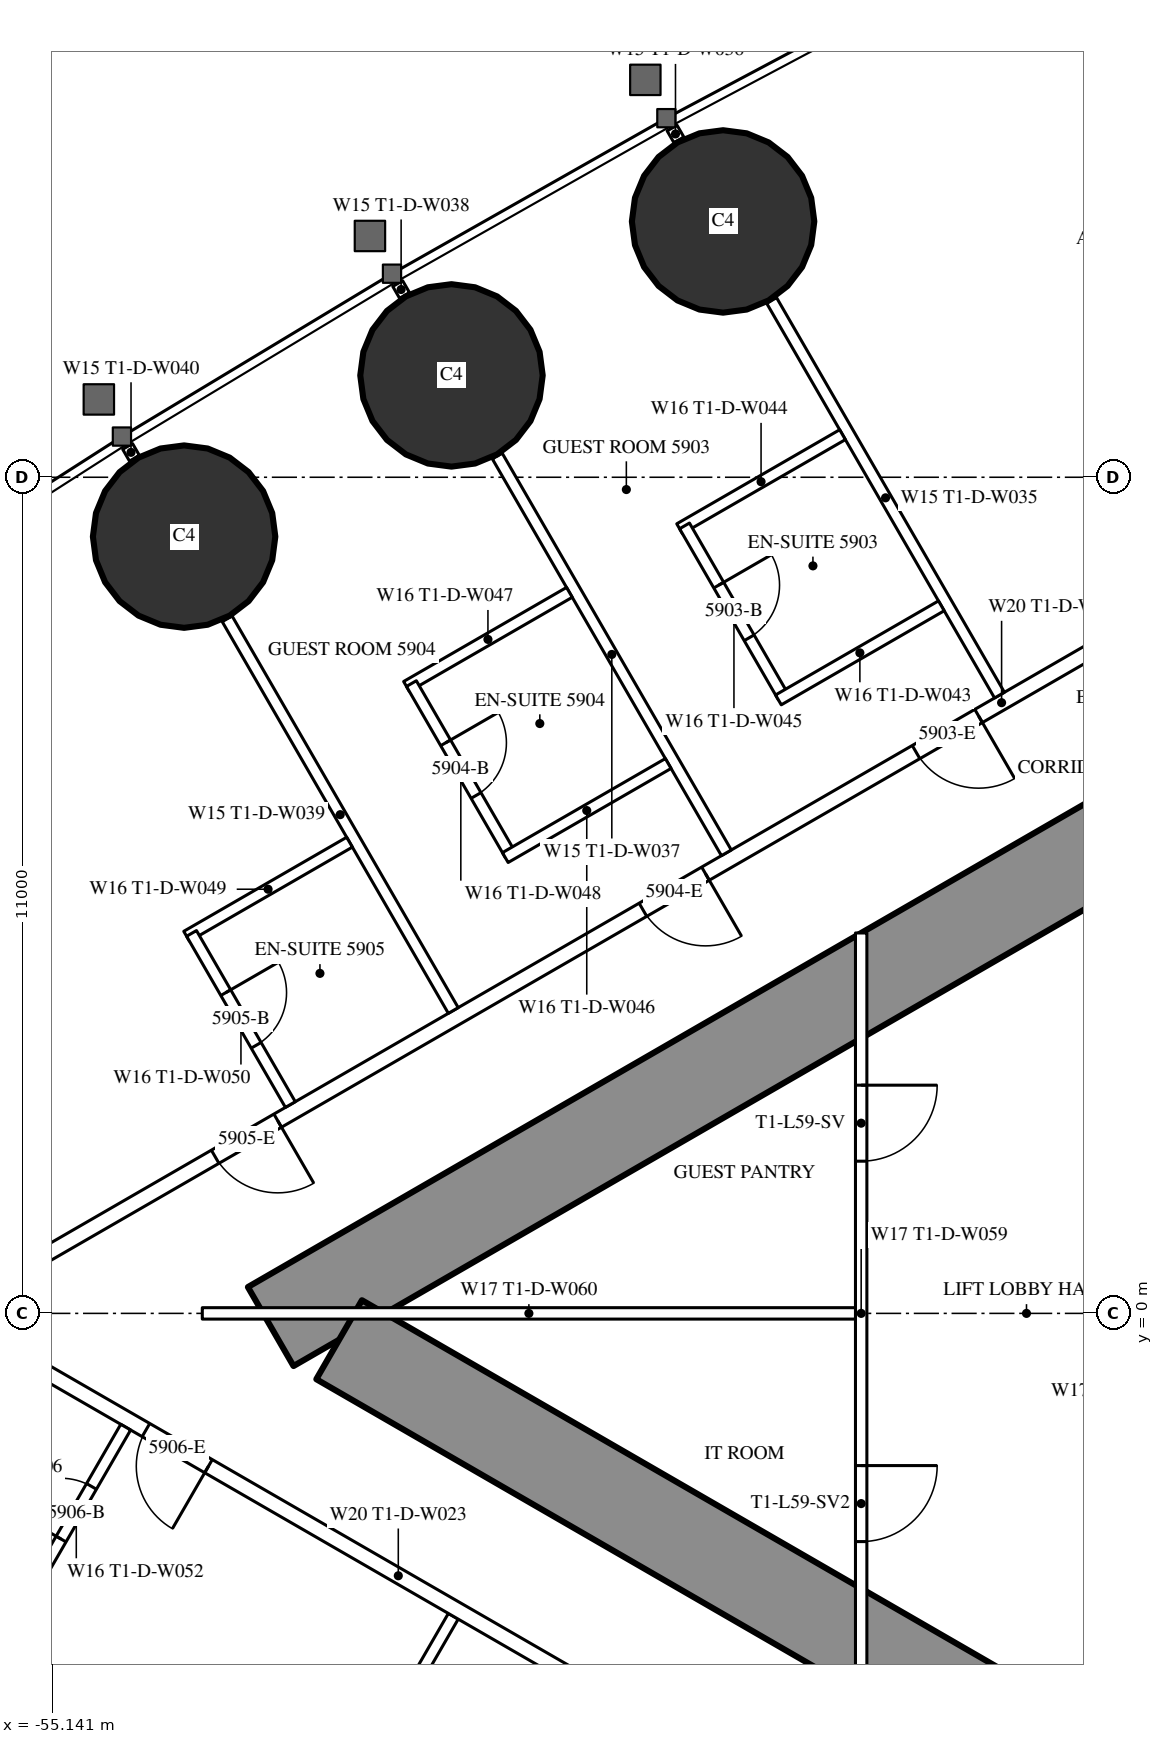
"""IFC4 building model, lengths in metres.
Left out: names, types, materials, properties, quantities, classifications, styles, units other than length and angle.
Written with IfcOpenShell. Run it as: python <this file> out.ifc"""

import sys

from ifc_helpers import new_model, si_unit, direction, frame, frame_2d, origin, origin_2d, place, context, subcontext, project, spatial, rectangle, circle, extrude, element, fill, save


model = new_model("IFC4")
c1 = context("Model", 3, precision=1e-05, world=origin(), true_north=direction((0.0, 1.0)))
c2 = subcontext(c1, "Body", "Model", "MODEL_VIEW")
j1 = project(units=[si_unit("LENGTHUNIT", "METRE"), si_unit("PLANEANGLEUNIT", "RADIAN")], contexts=[c1])
p1 = place(None, origin())
s1 = spatial("IfcSite", under=j1, at=p1, CompositionType="ELEMENT")
p2 = place(p1, origin())
s2 = spatial("IfcBuilding", under=s1, at=p2, CompositionType="ELEMENT")
p3 = place(p2, frame((0.0, 0.0, 222.5)))
s3 = spatial("IfcBuildingStorey", under=s2, at=p3, CompositionType="ELEMENT", Elevation=222.5)
for number, where, z_axis, x_axis in (
    (1, (-46.317, 14.365, 0.0), (0.0, 0.0, 1.0), (1.0, 0.0, 0.0)),
    (2, (-49.89, 12.34, 0.0), (0.0, 0.0, 1.0), (1.0, 0.0, 0.0)),
    (3, (-53.408, 10.219, 0.0), (0.0, 0.0, 1.0), (1.0, 0.0, 0.0)),
):
    element("IfcColumn", number, at=place(p3, frame(where, z_axis=z_axis, x_axis=x_axis)), inside=s3, PredefinedType="COLUMN", context=c2, shape_type="SweptSolid", body=[
        extrude(circle(Radius=1.2, at=origin_2d()), origin(), (0.0, 0.0, 1.0), 3.6),
    ])
p4 = place(p3, frame((-27.2, 14.3, 0.0), z_axis=(0.0, 0.0, 1.0), x_axis=(-0.866026593062, -0.499997940104, 0.0)))
e4 = element("IfcWall", 4, at=p4, inside=s3, PredefinedType="SHEAR", context=c2, shape_type="SweptSolid", body=[
    extrude(rectangle(XDim=28.946, YDim=1.2, at=frame_2d((14.473, 0.0))), origin(), (0.0, 0.0, 1.0), 3.6),
])
p5 = place(p4, frame((4.6, 0.0, 0.0)))
e5 = element("IfcOpeningElement", 5, at=p5, cuts=e4, PredefinedType="OPENING", context=c2, shape_type="SweptSolid", body=[
    extrude(rectangle(XDim=1.0, YDim=2.2, at=frame_2d((0.5, 1.1))), frame((0.0, 0.61, 0.0), z_axis=(0.0, -1.0, 0.0), x_axis=(1.0, 0.0, 0.0)), (0.0, 0.0, 1.0), 1.22),
])
p6 = place(p4, frame((13.395, 0.0, 0.0)))
e6 = element("IfcOpeningElement", 6, at=p6, cuts=e4, PredefinedType="OPENING", context=c2, shape_type="SweptSolid", body=[
    extrude(rectangle(XDim=1.8, YDim=2.2, at=frame_2d((0.9, 1.1))), frame((0.0, 0.61, 0.0), z_axis=(0.0, -1.0, 0.0), x_axis=(1.0, 0.0, 0.0)), (0.0, 0.0, 1.0), 1.22),
])
p7 = place(p3, frame((-27.2, -14.3, 0.0), z_axis=(0.0, 0.0, 1.0), x_axis=(-0.866024021859, 0.500002393557, 0.0)))
e7 = element("IfcWall", 7, at=p7, inside=s3, PredefinedType="SHEAR", context=c2, shape_type="SweptSolid", body=[
    extrude(rectangle(XDim=27.907, YDim=1.2, at=frame_2d((13.954, 0.0))), origin(), (0.0, 0.0, 1.0), 3.6),
])
p8 = place(p7, frame((4.6, 0.0, 0.0)))
e8 = element("IfcOpeningElement", 8, at=p8, cuts=e7, PredefinedType="OPENING", context=c2, shape_type="SweptSolid", body=[
    extrude(rectangle(XDim=1.0, YDim=2.2, at=frame_2d((0.5, 1.1))), frame((0.0, 0.61, 0.0), z_axis=(0.0, -1.0, 0.0), x_axis=(1.0, 0.0, 0.0)), (0.0, 0.0, 1.0), 1.22),
])
p9 = place(p7, frame((13.395, 0.0, 0.0)))
e9 = element("IfcOpeningElement", 9, at=p9, cuts=e7, PredefinedType="OPENING", context=c2, shape_type="SweptSolid", body=[
    extrude(rectangle(XDim=1.8, YDim=2.2, at=frame_2d((0.9, 1.1))), frame((0.0, 0.61, 0.0), z_axis=(0.0, -1.0, 0.0), x_axis=(1.0, 0.0, 0.0)), (0.0, 0.0, 1.0), 1.22),
])
p10 = place(p3, frame((-28.737, 16.068, 0.0), z_axis=(0.0, 0.0, 1.0), x_axis=(-0.866026057212, -0.499998868229, 0.0)))
e10 = element("IfcWall", 10, at=p10, inside=s3, PredefinedType="PARTITIONING", context=c2, shape_type="SweptSolid", body=[
    extrude(rectangle(XDim=32.137, YDim=0.2, at=frame_2d((16.068, 0.0))), origin(), (0.0, 0.0, 1.0), 3.35),
])
p11 = place(p10, frame((1.08, 0.0, 0.0)))
e11 = element("IfcOpeningElement", 11, at=p11, cuts=e10, PredefinedType="OPENING", context=c2, shape_type="SweptSolid", body=[
    extrude(rectangle(XDim=1.8, YDim=2.03, at=frame_2d((0.9, 1.015))), frame((0.0, 0.11, 0.0), z_axis=(0.0, -1.0, 0.0), x_axis=(1.0, 0.0, 0.0)), (0.0, 0.0, 1.0), 0.22),
])
p12 = place(p10, frame((6.86, 0.0, 0.0)))
e12 = element("IfcOpeningElement", 12, at=p12, cuts=e10, PredefinedType="OPENING", context=c2, shape_type="SweptSolid", body=[
    extrude(rectangle(XDim=1.0, YDim=2.2, at=frame_2d((0.5, 1.1))), frame((0.0, 0.11, 0.0), z_axis=(0.0, -1.0, 0.0), x_axis=(1.0, 0.0, 0.0)), (0.0, 0.0, 1.0), 0.22),
])
p13 = place(p10, frame((16.418, 0.0, 0.0)))
e13 = element("IfcOpeningElement", 13, at=p13, cuts=e10, PredefinedType="OPENING", context=c2, shape_type="SweptSolid", body=[
    extrude(rectangle(XDim=0.95, YDim=2.2, at=frame_2d((0.475, 1.1))), frame((0.0, 0.11, 0.0), z_axis=(0.0, -1.0, 0.0), x_axis=(1.0, 0.0, 0.0)), (0.0, 0.0, 1.0), 0.22),
])
p14 = place(p10, frame((20.567, 0.0, 0.0)))
e14 = element("IfcOpeningElement", 14, at=p14, cuts=e10, PredefinedType="OPENING", context=c2, shape_type="SweptSolid", body=[
    extrude(rectangle(XDim=0.95, YDim=2.2, at=frame_2d((0.475, 1.1))), frame((0.0, 0.11, 0.0), z_axis=(0.0, -1.0, 0.0), x_axis=(1.0, 0.0, 0.0)), (0.0, 0.0, 1.0), 0.22),
])
p15 = place(p10, frame((27.065, 0.0, 0.0)))
e15 = element("IfcOpeningElement", 15, at=p15, cuts=e10, PredefinedType="OPENING", context=c2, shape_type="SweptSolid", body=[
    extrude(rectangle(XDim=0.95, YDim=2.2, at=frame_2d((0.475, 1.1))), frame((0.0, 0.11, 0.0), z_axis=(0.0, -1.0, 0.0), x_axis=(1.0, 0.0, 0.0)), (0.0, 0.0, 1.0), 0.22),
])
p16 = place(p3, frame((-42.68, 8.134, 0.0), z_axis=(0.0, 0.0, 1.0), x_axis=(-0.499984479505, 0.866034364361, 0.0)))
e16 = element("IfcWall", 16, at=p16, inside=s3, PredefinedType="PARTITIONING", context=c2, shape_type="SweptSolid", body=[
    extrude(rectangle(XDim=5.995, YDim=0.15, at=frame_2d((2.998, 0.0))), origin(), (0.0, 0.0, 1.0), 2.45),
])
p17 = place(p3, frame((-46.898, 15.439, 0.0), z_axis=(0.0, 0.0, 1.0), x_axis=(-0.500232303069, 0.865891241997, 0.0)))
e17 = element("IfcWall", 17, at=p17, inside=s3, PredefinedType="PARTITIONING", context=c2, shape_type="SweptSolid", body=[
    extrude(rectangle(XDim=0.18, YDim=0.15, at=frame_2d((0.09, 0.0))), origin(), (0.0, 0.0, 1.0), 2.45),
])
p18 = place(p3, frame((-46.274, 6.059, 0.0), z_axis=(0.0, 0.0, 1.0), x_axis=(-0.500020471368, 0.866013584312, 0.0)))
e18 = element("IfcWall", 18, at=p18, inside=s3, PredefinedType="PARTITIONING", context=c2, shape_type="SweptSolid", body=[
    extrude(rectangle(XDim=6.028, YDim=0.15, at=frame_2d((3.014, 0.0))), origin(), (0.0, 0.0, 1.0), 2.45),
])
p19 = place(p3, frame((-50.508, 13.392, 0.0), z_axis=(0.0, 0.0, 1.0), x_axis=(-0.499644091975, 0.866230789891, 0.0)))
e19 = element("IfcWall", 19, at=p19, inside=s3, PredefinedType="PARTITIONING", context=c2, shape_type="SweptSolid", body=[
    extrude(rectangle(XDim=0.18, YDim=0.15, at=frame_2d((0.09, 0.0))), origin(), (0.0, 0.0, 1.0), 2.45),
])
p20 = place(p3, frame((-49.866, 3.985, 0.0), z_axis=(0.0, 0.0, 1.0), x_axis=(-0.500000694566, 0.866025002776, 0.0)))
e20 = element("IfcWall", 20, at=p20, inside=s3, PredefinedType="PARTITIONING", context=c2, shape_type="SweptSolid", body=[
    extrude(rectangle(XDim=5.95, YDim=0.15, at=frame_2d((2.975, 0.0))), origin(), (0.0, 0.0, 1.0), 2.45),
])
p21 = place(p3, frame((-54.061, 11.25, 0.0), z_axis=(0.0, 0.0, 1.0), x_axis=(-0.500391173478, 0.865799441849, 0.0)))
e21 = element("IfcWall", 21, at=p21, inside=s3, PredefinedType="PARTITIONING", context=c2, shape_type="SweptSolid", body=[
    extrude(rectangle(XDim=0.179, YDim=0.15, at=frame_2d((0.089, 0.0))), origin(), (0.0, 0.0, 1.0), 2.45),
])
p22 = place(p3, frame((-49.866, -3.985, 0.0), z_axis=(0.0, 0.0, 1.0), x_axis=(-0.500000694566, -0.866025002776, 0.0)))
e22 = element("IfcWall", 22, at=p22, inside=s3, PredefinedType="PARTITIONING", context=c2, shape_type="SweptSolid", body=[
    extrude(rectangle(XDim=5.95, YDim=0.15, at=frame_2d((2.975, 0.0))), origin(), (0.0, 0.0, 1.0), 2.45),
])
p23 = place(p22, frame((3.5, 0.0, 0.0)))
e23 = element("IfcOpeningElement", 23, at=p23, cuts=e22, PredefinedType="OPENING", context=c2, shape_type="SweptSolid", body=[
    extrude(rectangle(XDim=0.9, YDim=2.2, at=frame_2d((0.45, 1.1))), frame((0.0, 0.085, 0.0), z_axis=(0.0, -1.0, 0.0), x_axis=(1.0, 0.0, 0.0)), (0.0, 0.0, 1.0), 0.17),
])
p24 = place(p3, frame((-44.715, -6.844, 0.0), z_axis=(0.0, 0.0, 1.0), x_axis=(-0.866025261224, 0.500000246922, 0.0)))
e24 = element("IfcWall", 24, at=p24, inside=s3, PredefinedType="PARTITIONING", context=c2, shape_type="SweptSolid", body=[
    extrude(rectangle(XDim=13.567, YDim=0.2, at=frame_2d((6.783, 0.0))), origin(), (0.0, 0.0, 1.0), 3.35),
])
p25 = place(p24, frame((9.667, 0.0, 0.0)))
e25 = element("IfcOpeningElement", 25, at=p25, cuts=e24, PredefinedType="OPENING", context=c2, shape_type="SweptSolid", body=[
    extrude(rectangle(XDim=0.95, YDim=2.2, at=frame_2d((0.475, 1.1))), frame((0.0, 0.11, 0.0), z_axis=(0.0, -1.0, 0.0), x_axis=(1.0, 0.0, 0.0)), (0.0, 0.0, 1.0), 0.22),
])
p26 = place(p24, frame((2.117, 0.0, 0.0)))
e26 = element("IfcOpeningElement", 26, at=p26, cuts=e24, PredefinedType="OPENING", context=c2, shape_type="SweptSolid", body=[
    extrude(rectangle(XDim=0.95, YDim=2.2, at=frame_2d((0.475, 1.1))), frame((0.0, 0.11, 0.0), z_axis=(0.0, -1.0, 0.0), x_axis=(1.0, 0.0, 0.0)), (0.0, 0.0, 1.0), 0.22),
])
p27 = place(p24, frame((0.5, 0.0, 0.0)))
e27 = element("IfcOpeningElement", 27, at=p27, cuts=e24, PredefinedType="OPENING", context=c2, shape_type="SweptSolid", body=[
    extrude(rectangle(XDim=0.967, YDim=2.2, at=frame_2d((0.483, 1.1))), frame((0.0, 0.11, 0.0), z_axis=(0.0, -1.0, 0.0), x_axis=(1.0, 0.0, 0.0)), (0.0, 0.0, 1.0), 0.22),
])
p28 = place(p3, frame((-44.745, 11.56, 0.0), z_axis=(0.0, 0.0, 1.0), x_axis=(-0.866006523861, -0.500032699561, 0.0)))
e28 = element("IfcWall", 28, at=p28, inside=s3, PredefinedType="PARTITIONING", context=c2, shape_type="SweptSolid", body=[
    extrude(rectangle(XDim=2.475, YDim=0.15, at=frame_2d((1.237, 0.0))), origin(), (0.0, 0.0, 1.0), 3.35),
])
p29 = place(p3, frame((-45.524, 8.109, 0.0), z_axis=(0.0, 0.0, 1.0), x_axis=(-0.49997716683, 0.86603858612, 0.0)))
e29 = element("IfcWall", 29, at=p29, inside=s3, PredefinedType="PARTITIONING", context=c2, shape_type="SweptSolid", body=[
    extrude(rectangle(XDim=2.6, YDim=0.15, at=frame_2d((1.3, 0.0))), origin(), (0.0, 0.0, 1.0), 3.35),
])
p30 = place(p29, frame((0.9, 0.0, 0.0)))
e30 = element("IfcOpeningElement", 30, at=p30, cuts=e29, PredefinedType="OPENING", context=c2, shape_type="SweptSolid", body=[
    extrude(rectangle(XDim=0.8, YDim=2.2, at=frame_2d((0.4, 1.1))), frame((0.0, 0.085, 0.0), z_axis=(0.0, -1.0, 0.0), x_axis=(1.0, 0.0, 0.0)), (0.0, 0.0, 1.0), 0.17),
])
p31 = place(p3, frame((-43.445, 9.309, 0.0), z_axis=(0.0, 0.0, 1.0), x_axis=(-0.866031185235, -0.4999899861, 0.0)))
e31 = element("IfcWall", 31, at=p31, inside=s3, PredefinedType="PARTITIONING", context=c2, shape_type="SweptSolid", body=[
    extrude(rectangle(XDim=2.475, YDim=0.15, at=frame_2d((1.238, 0.0))), origin(), (0.0, 0.0, 1.0), 3.35),
])
p32 = place(p3, frame((-48.339, 9.486, 0.0), z_axis=(0.0, 0.0, 1.0), x_axis=(-0.866006523861, -0.500032699561, 0.0)))
e32 = element("IfcWall", 32, at=p32, inside=s3, PredefinedType="PARTITIONING", context=c2, shape_type="SweptSolid", body=[
    extrude(rectangle(XDim=2.475, YDim=0.15, at=frame_2d((1.237, 0.0))), origin(), (0.0, 0.0, 1.0), 3.35),
])
p33 = place(p3, frame((-49.117, 6.034, 0.0), z_axis=(0.0, 0.0, 1.0), x_axis=(-0.500006934395, 0.866021400173, 0.0)))
e33 = element("IfcWall", 33, at=p33, inside=s3, PredefinedType="PARTITIONING", context=c2, shape_type="SweptSolid", body=[
    extrude(rectangle(XDim=2.6, YDim=0.15, at=frame_2d((1.3, 0.0))), origin(), (0.0, 0.0, 1.0), 3.35),
])
p34 = place(p33, frame((0.9, 0.0, 0.0)))
e34 = element("IfcOpeningElement", 34, at=p34, cuts=e33, PredefinedType="OPENING", context=c2, shape_type="SweptSolid", body=[
    extrude(rectangle(XDim=0.8, YDim=2.2, at=frame_2d((0.4, 1.1))), frame((0.0, 0.085, 0.0), z_axis=(0.0, -1.0, 0.0), x_axis=(1.0, 0.0, 0.0)), (0.0, 0.0, 1.0), 0.17),
])
for number, where, z_axis, x_axis in (
    (35, (-47.039, 7.234, 0.0), (0.0, 0.0, 1.0), (-0.866, -0.5, 0.0)),
    (36, (-51.231, 6.199, 0.0), (0.0, 0.0, 1.0), (-0.866, -0.5, 0.0)),
):
    element("IfcWall", number, at=place(p3, frame(where, z_axis=z_axis, x_axis=x_axis)), inside=s3, PredefinedType="PARTITIONING", context=c2, shape_type="SweptSolid", body=[
        extrude(rectangle(XDim=2.475, YDim=0.15, at=frame_2d((1.238, 0.0))), origin(), (0.0, 0.0, 1.0), 3.35),
    ])
p35 = place(p3, frame((-52.01, 2.747, 0.0), z_axis=(0.0, 0.0, 1.0), x_axis=(-0.500006934395, 0.866021400173, 0.0)))
e37 = element("IfcWall", 37, at=p35, inside=s3, PredefinedType="PARTITIONING", context=c2, shape_type="SweptSolid", body=[
    extrude(rectangle(XDim=2.6, YDim=0.15, at=frame_2d((1.3, 0.0))), origin(), (0.0, 0.0, 1.0), 3.35),
])
p36 = place(p35, frame((0.9, 0.0, 0.0)))
e38 = element("IfcOpeningElement", 38, at=p36, cuts=e37, PredefinedType="OPENING", context=c2, shape_type="SweptSolid", body=[
    extrude(rectangle(XDim=0.8, YDim=2.2, at=frame_2d((0.4, 1.1))), frame((0.0, 0.085, 0.0), z_axis=(0.0, -1.0, 0.0), x_axis=(1.0, 0.0, 0.0)), (0.0, 0.0, 1.0), 0.17),
])
p37 = place(p3, frame((-54.176, -1.497, 0.0), z_axis=(0.0, 0.0, 1.0), x_axis=(-0.500006934395, -0.866021400173, 0.0)))
e39 = element("IfcWall", 39, at=p37, inside=s3, PredefinedType="PARTITIONING", context=c2, shape_type="SweptSolid", body=[
    extrude(rectangle(XDim=2.6, YDim=0.15, at=frame_2d((1.3, 0.0))), origin(), (0.0, 0.0, 1.0), 3.35),
])
p38 = place(p37, frame((0.9, 0.0, 0.0)))
e40 = element("IfcOpeningElement", 40, at=p38, cuts=e39, PredefinedType="OPENING", context=c2, shape_type="SweptSolid", body=[
    extrude(rectangle(XDim=0.8, YDim=2.2, at=frame_2d((0.4, 1.1))), frame((0.0, 0.085, 0.0), z_axis=(0.0, -1.0, 0.0), x_axis=(1.0, 0.0, 0.0)), (0.0, 0.0, 1.0), 0.17),
])
p39 = place(p3, frame((-44.5, 5.005, 0.0), z_axis=(0.0, 0.0, 1.0), x_axis=(0.0, -1.0, 0.0)))
e41 = element("IfcWall", 41, at=p39, inside=s3, PredefinedType="PARTITIONING", context=c2, shape_type="SweptSolid", body=[
    extrude(rectangle(XDim=10.009, YDim=0.15, at=frame_2d((5.005, 0.0))), origin(), (0.0, 0.0, 1.0), 2.5),
])
p40 = place(p39, frame((2.002, 0.0, 0.0)))
e42 = element("IfcOpeningElement", 42, at=p40, cuts=e41, PredefinedType="OPENING", context=c2, shape_type="SweptSolid", body=[
    extrude(rectangle(XDim=1.0, YDim=2.2, at=frame_2d((0.5, 1.1))), frame((0.0, 0.085, 0.0), z_axis=(0.0, -1.0, 0.0), x_axis=(1.0, 0.0, 0.0)), (0.0, 0.0, 1.0), 0.17),
])
p41 = place(p39, frame((7.007, 0.0, 0.0)))
e43 = element("IfcOpeningElement", 43, at=p41, cuts=e41, PredefinedType="OPENING", context=c2, shape_type="SweptSolid", body=[
    extrude(rectangle(XDim=1.0, YDim=2.2, at=frame_2d((0.5, 1.1))), frame((0.0, 0.085, 0.0), z_axis=(0.0, -1.0, 0.0), x_axis=(1.0, 0.0, 0.0)), (0.0, 0.0, 1.0), 0.17),
])
p42 = place(p3, frame((-44.575, 0.0, 0.0), z_axis=(0.0, 0.0, 1.0), x_axis=(-1.0, 0.0, 0.0)))
e44 = element("IfcWall", 44, at=p42, inside=s3, PredefinedType="PARTITIONING", context=c2, shape_type="SweptSolid", body=[
    extrude(rectangle(XDim=8.593, YDim=0.15, at=frame_2d((4.297, 0.0))), origin(), (0.0, 0.0, 1.0), 2.45),
])
p43 = place(p30, origin())
e45 = element("IfcDoor", 45, at=p43, inside=s3, OperationType="SINGLE_SWING_RIGHT", PredefinedType="DOOR", context=c2, shape_type="SweptSolid", body=[
    extrude(rectangle(XDim=0.8, YDim=2.2, at=frame_2d((0.4, 1.1))), frame((0.0, 0.025, 0.0), z_axis=(0.0, -1.0, 0.0), x_axis=(1.0, 0.0, 0.0)), (0.0, 0.0, 1.0), 0.05),
])
fill(e30, e45)
p44 = place(p13, origin())
e46 = element("IfcDoor", 46, at=p44, inside=s3, OperationType="SINGLE_SWING_LEFT", PredefinedType="DOOR", context=c2, shape_type="SweptSolid", body=[
    extrude(rectangle(XDim=0.95, YDim=2.2, at=frame_2d((0.475, 1.1))), frame((0.0, 0.025, 0.0), z_axis=(0.0, -1.0, 0.0), x_axis=(1.0, 0.0, 0.0)), (0.0, 0.0, 1.0), 0.05),
])
fill(e13, e46)
p45 = place(p34, origin())
e47 = element("IfcDoor", 47, at=p45, inside=s3, OperationType="SINGLE_SWING_RIGHT", PredefinedType="DOOR", context=c2, shape_type="SweptSolid", body=[
    extrude(rectangle(XDim=0.8, YDim=2.2, at=frame_2d((0.4, 1.1))), frame((0.0, 0.025, 0.0), z_axis=(0.0, -1.0, 0.0), x_axis=(1.0, 0.0, 0.0)), (0.0, 0.0, 1.0), 0.05),
])
fill(e34, e47)
p46 = place(p14, origin())
e48 = element("IfcDoor", 48, at=p46, inside=s3, OperationType="SINGLE_SWING_LEFT", PredefinedType="DOOR", context=c2, shape_type="SweptSolid", body=[
    extrude(rectangle(XDim=0.95, YDim=2.2, at=frame_2d((0.475, 1.1))), frame((0.0, 0.025, 0.0), z_axis=(0.0, -1.0, 0.0), x_axis=(1.0, 0.0, 0.0)), (0.0, 0.0, 1.0), 0.05),
])
fill(e14, e48)
p47 = place(p36, origin())
e49 = element("IfcDoor", 49, at=p47, inside=s3, OperationType="SINGLE_SWING_RIGHT", PredefinedType="DOOR", context=c2, shape_type="SweptSolid", body=[
    extrude(rectangle(XDim=0.8, YDim=2.2, at=frame_2d((0.4, 1.1))), frame((0.0, 0.025, 0.0), z_axis=(0.0, -1.0, 0.0), x_axis=(1.0, 0.0, 0.0)), (0.0, 0.0, 1.0), 0.05),
])
fill(e38, e49)
p48 = place(p15, origin())
e50 = element("IfcDoor", 50, at=p48, inside=s3, OperationType="SINGLE_SWING_LEFT", PredefinedType="DOOR", context=c2, shape_type="SweptSolid", body=[
    extrude(rectangle(XDim=0.95, YDim=2.2, at=frame_2d((0.475, 1.1))), frame((0.0, 0.025, 0.0), z_axis=(0.0, -1.0, 0.0), x_axis=(1.0, 0.0, 0.0)), (0.0, 0.0, 1.0), 0.05),
])
fill(e15, e50)
p49 = place(p38, origin())
e51 = element("IfcDoor", 51, at=p49, inside=s3, OperationType="SINGLE_SWING_RIGHT", PredefinedType="DOOR", context=c2, shape_type="SweptSolid", body=[
    extrude(rectangle(XDim=0.8, YDim=2.2, at=frame_2d((0.4, 1.1))), frame((0.0, 0.025, 0.0), z_axis=(0.0, -1.0, 0.0), x_axis=(1.0, 0.0, 0.0)), (0.0, 0.0, 1.0), 0.05),
])
fill(e40, e51)
p50 = place(p25, origin())
e52 = element("IfcDoor", 52, at=p50, inside=s3, OperationType="SINGLE_SWING_LEFT", PredefinedType="DOOR", context=c2, shape_type="SweptSolid", body=[
    extrude(rectangle(XDim=0.95, YDim=2.2, at=frame_2d((0.475, 1.1))), frame((0.0, 0.025, 0.0), z_axis=(0.0, -1.0, 0.0), x_axis=(1.0, 0.0, 0.0)), (0.0, 0.0, 1.0), 0.05),
])
fill(e25, e52)
p51 = place(p40, origin())
e53 = element("IfcDoor", 53, at=p51, inside=s3, OperationType="SINGLE_SWING_LEFT", PredefinedType="DOOR", context=c2, shape_type="SweptSolid", body=[
    extrude(rectangle(XDim=1.0, YDim=2.2, at=frame_2d((0.5, 1.1))), frame((0.0, 0.025, 0.0), z_axis=(0.0, -1.0, 0.0), x_axis=(1.0, 0.0, 0.0)), (0.0, 0.0, 1.0), 0.05),
])
fill(e42, e53)
p52 = place(p41, origin())
e54 = element("IfcDoor", 54, at=p52, inside=s3, OperationType="SINGLE_SWING_LEFT", PredefinedType="DOOR", context=c2, shape_type="SweptSolid", body=[
    extrude(rectangle(XDim=1.0, YDim=2.2, at=frame_2d((0.5, 1.1))), frame((0.0, 0.025, 0.0), z_axis=(0.0, -1.0, 0.0), x_axis=(1.0, 0.0, 0.0)), (0.0, 0.0, 1.0), 0.05),
])
fill(e43, e54)
save(model, sys.argv[1])
